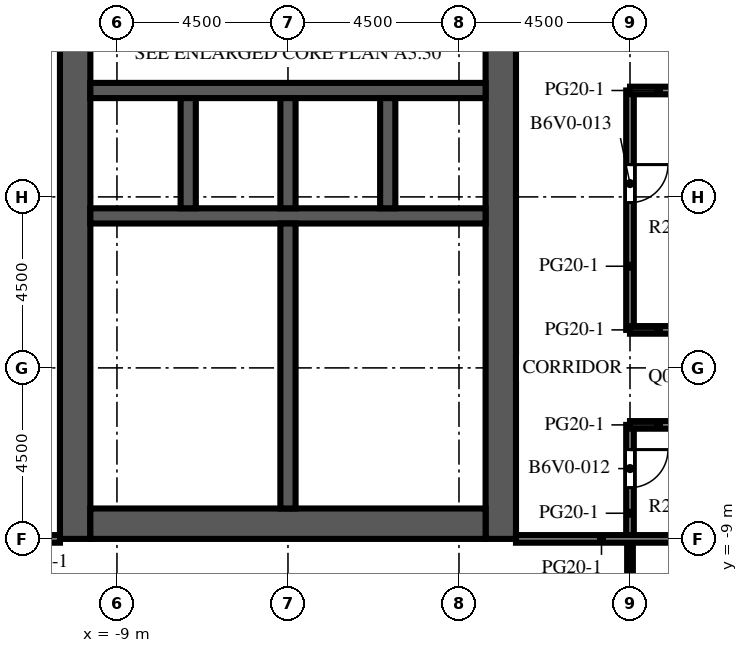
"""IFC4 building model, lengths in metres.
Left out: names, types, materials, properties, quantities, classifications, styles, units other than length and angle.
Written with IfcOpenShell. Run it as: python <this file> out.ifc"""

import sys

from ifc_helpers import new_model, si_unit, direction, frame, frame_2d, origin, place, context, subcontext, project, spatial, rectangle, extrude, element, fill, save


model = new_model("IFC4")
c1 = context("Model", 3, precision=1e-05, world=origin(), true_north=direction((0.0, 1.0)))
c2 = subcontext(c1, "Body", "Model", "MODEL_VIEW")
j1 = project(units=[si_unit("LENGTHUNIT", "METRE"), si_unit("PLANEANGLEUNIT", "RADIAN")], contexts=[c1])
p1 = place(None, origin())
s1 = spatial("IfcSite", under=j1, at=p1, CompositionType="ELEMENT")
p2 = place(p1, origin())
s2 = spatial("IfcBuilding", under=s1, at=p2, CompositionType="ELEMENT")
p3 = place(p2, frame((0.0, 0.0, 195.6)))
s3 = spatial("IfcBuildingStorey", under=s2, at=p3, CompositionType="ELEMENT", Elevation=195.6)
p4 = place(p3, frame((-10.1, -9.0, 0.0), z_axis=(0.0, 0.0, 1.0), x_axis=(0.0, 1.0, 0.0)))
e1 = element("IfcWall", 1, at=p4, inside=s3, PredefinedType="SHEAR", context=c2, shape_type="SweptSolid", body=[
    extrude(rectangle(XDim=27.5, YDim=0.8, at=frame_2d((13.75, 0.0))), origin(), (0.0, 0.0, 1.0), 4.1),
])
p5 = place(p4, frame((12.55, 0.0, 0.0)))
e2 = element("IfcOpeningElement", 2, at=p5, cuts=e1, PredefinedType="OPENING", context=c2, shape_type="SweptSolid", body=[
    extrude(rectangle(XDim=2.4, YDim=2.4, at=frame_2d((1.2, 1.2))), frame((0.0, 0.41, 0.0), z_axis=(0.0, -1.0, 0.0), x_axis=(1.0, 0.0, 0.0)), (0.0, 0.0, 1.0), 0.82),
])
p6 = place(p4, frame((6.825, 0.0, 0.0)))
e3 = element("IfcOpeningElement", 3, at=p6, cuts=e1, PredefinedType="OPENING", context=c2, shape_type="SweptSolid", body=[
    extrude(rectangle(XDim=1.2, YDim=2.1, at=frame_2d((0.6, 1.05))), frame((0.0, 0.41, 0.0), z_axis=(0.0, -1.0, 0.0), x_axis=(1.0, 0.0, 0.0)), (0.0, 0.0, 1.0), 0.82),
])
p7 = place(p4, frame((19.475, 0.0, 0.0)))
e4 = element("IfcOpeningElement", 4, at=p7, cuts=e1, PredefinedType="OPENING", context=c2, shape_type="SweptSolid", body=[
    extrude(rectangle(XDim=1.2, YDim=2.1, at=frame_2d((0.6, 1.05))), frame((0.0, 0.41, 0.0), z_axis=(0.0, -1.0, 0.0), x_axis=(1.0, 0.0, 0.0)), (0.0, 0.0, 1.0), 0.82),
])
p8 = place(p3, frame((1.1, -9.0, 0.0), z_axis=(0.0, 0.0, 1.0), x_axis=(0.0, 1.0, 0.0)))
e5 = element("IfcWall", 5, at=p8, inside=s3, PredefinedType="SHEAR", context=c2, shape_type="SweptSolid", body=[
    extrude(rectangle(XDim=27.5, YDim=0.8, at=frame_2d((13.75, 0.0))), origin(), (0.0, 0.0, 1.0), 4.1),
])
p9 = place(p8, frame((12.55, 0.0, 0.0)))
e6 = element("IfcOpeningElement", 6, at=p9, cuts=e5, PredefinedType="OPENING", context=c2, shape_type="SweptSolid", body=[
    extrude(rectangle(XDim=2.4, YDim=2.4, at=frame_2d((1.2, 1.2))), frame((0.0, 0.41, 0.0), z_axis=(0.0, -1.0, 0.0), x_axis=(1.0, 0.0, 0.0)), (0.0, 0.0, 1.0), 0.82),
])
p10 = place(p8, frame((3.95, 0.0, 0.0)))
e7 = element("IfcOpeningElement", 7, at=p10, cuts=e5, PredefinedType="OPENING", context=c2, shape_type="SweptSolid", body=[
    extrude(rectangle(XDim=1.2, YDim=2.1, at=frame_2d((0.6, 1.05))), frame((0.0, 0.41, 0.0), z_axis=(0.0, -1.0, 0.0), x_axis=(1.0, 0.0, 0.0)), (0.0, 0.0, 1.0), 0.82),
])
p11 = place(p8, frame((19.45, 0.0, 0.0)))
e8 = element("IfcOpeningElement", 8, at=p11, cuts=e5, PredefinedType="OPENING", context=c2, shape_type="SweptSolid", body=[
    extrude(rectangle(XDim=1.0, YDim=2.1, at=frame_2d((0.5, 1.05))), frame((0.0, 0.41, 0.0), z_axis=(0.0, -1.0, 0.0), x_axis=(1.0, 0.0, 0.0)), (0.0, 0.0, 1.0), 0.82),
])
p12 = place(p8, frame((21.137, 0.0, 0.0)))
e9 = element("IfcOpeningElement", 9, at=p12, cuts=e5, PredefinedType="OPENING", context=c2, shape_type="SweptSolid", body=[
    extrude(rectangle(XDim=1.0, YDim=2.1, at=frame_2d((0.5, 1.05))), frame((0.0, 0.41, 0.0), z_axis=(0.0, -1.0, 0.0), x_axis=(1.0, 0.0, 0.0)), (0.0, 0.0, 1.0), 0.82),
])
p13 = place(p8, frame((23.2, 0.0, 0.0)))
e10 = element("IfcOpeningElement", 10, at=p13, cuts=e5, PredefinedType="OPENING", context=c2, shape_type="SweptSolid", body=[
    extrude(rectangle(XDim=1.0, YDim=2.1, at=frame_2d((0.5, 1.05))), frame((0.0, 0.41, 0.0), z_axis=(0.0, -1.0, 0.0), x_axis=(1.0, 0.0, 0.0)), (0.0, 0.0, 1.0), 0.82),
])
p14 = place(p8, frame((25.262, 0.0, 0.0)))
e11 = element("IfcOpeningElement", 11, at=p14, cuts=e5, PredefinedType="OPENING", context=c2, shape_type="SweptSolid", body=[
    extrude(rectangle(XDim=1.0, YDim=2.1, at=frame_2d((0.5, 1.05))), frame((0.0, 0.41, 0.0), z_axis=(0.0, -1.0, 0.0), x_axis=(1.0, 0.0, 0.0)), (0.0, 0.0, 1.0), 0.82),
])
p15 = place(p3, frame((-9.7, -8.6, 0.0), z_axis=(0.0, 0.0, 1.0), x_axis=(1.0, 0.0, 0.0)))
e12 = element("IfcWall", 12, at=p15, inside=s3, PredefinedType="SHEAR", context=c2, shape_type="SweptSolid", body=[
    extrude(rectangle(XDim=10.4, YDim=0.8, at=frame_2d((5.2, 0.0))), origin(), (0.0, 0.0, 1.0), 4.1),
])
p16 = place(p3, frame((-9.7, -0.5, 0.0), z_axis=(0.0, 0.0, 1.0), x_axis=(1.0, 0.0, 0.0)))
e13 = element("IfcWall", 13, at=p16, inside=s3, PredefinedType="SHEAR", context=c2, shape_type="SweptSolid", body=[
    extrude(rectangle(XDim=10.4, YDim=0.4, at=frame_2d((5.2, 0.0))), origin(), (0.0, 0.0, 1.0), 4.1),
])
p17 = place(p3, frame((-9.7, 2.8, 0.0), z_axis=(0.0, 0.0, 1.0), x_axis=(1.0, 0.0, 0.0)))
e14 = element("IfcWall", 14, at=p17, inside=s3, PredefinedType="SHEAR", context=c2, shape_type="SweptSolid", body=[
    extrude(rectangle(XDim=10.4, YDim=0.4, at=frame_2d((5.2, 0.0))), origin(), (0.0, 0.0, 1.0), 4.1),
])
p18 = place(p17, frame((0.738, 0.0, 0.0)))
e15 = element("IfcOpeningElement", 15, at=p18, cuts=e14, PredefinedType="OPENING", context=c2, shape_type="SweptSolid", body=[
    extrude(rectangle(XDim=1.1, YDim=2.1, at=frame_2d((0.55, 1.05))), frame((0.0, 0.21, 0.0), z_axis=(0.0, -1.0, 0.0), x_axis=(1.0, 0.0, 0.0)), (0.0, 0.0, 1.0), 0.42),
])
p19 = place(p17, frame((3.337, 0.0, 0.0)))
e16 = element("IfcOpeningElement", 16, at=p19, cuts=e14, PredefinedType="OPENING", context=c2, shape_type="SweptSolid", body=[
    extrude(rectangle(XDim=1.1, YDim=2.1, at=frame_2d((0.55, 1.05))), frame((0.0, 0.21, 0.0), z_axis=(0.0, -1.0, 0.0), x_axis=(1.0, 0.0, 0.0)), (0.0, 0.0, 1.0), 0.42),
])
p20 = place(p17, frame((6.012, 0.0, 0.0)))
e17 = element("IfcOpeningElement", 17, at=p20, cuts=e14, PredefinedType="OPENING", context=c2, shape_type="SweptSolid", body=[
    extrude(rectangle(XDim=1.0, YDim=2.1, at=frame_2d((0.5, 1.05))), frame((0.0, 0.21, 0.0), z_axis=(0.0, -1.0, 0.0), x_axis=(1.0, 0.0, 0.0)), (0.0, 0.0, 1.0), 0.42),
])
p21 = place(p17, frame((8.613, 0.0, 0.0)))
e18 = element("IfcOpeningElement", 18, at=p21, cuts=e14, PredefinedType="OPENING", context=c2, shape_type="SweptSolid", body=[
    extrude(rectangle(XDim=1.0, YDim=2.1, at=frame_2d((0.5, 1.05))), frame((0.0, 0.21, 0.0), z_axis=(0.0, -1.0, 0.0), x_axis=(1.0, 0.0, 0.0)), (0.0, 0.0, 1.0), 0.42),
])
for number, where, z_axis, x_axis in (
    (19, (-7.125, -0.3, 0.0), (0.0, 0.0, 1.0), (0.0, 1.0, 0.0)),
    (20, (-4.5, -0.3, 0.0), (0.0, 0.0, 1.0), (0.0, 1.0, 0.0)),
    (21, (-1.875, -0.3, 0.0), (0.0, 0.0, 1.0), (0.0, 1.0, 0.0)),
):
    element("IfcWall", number, at=place(p3, frame(where, z_axis=z_axis, x_axis=x_axis)), inside=s3, PredefinedType="SHEAR", context=c2, shape_type="SweptSolid", body=[
        extrude(rectangle(XDim=2.9, YDim=0.4, at=frame_2d((1.45, 0.0))), origin(), (0.0, 0.0, 1.0), 4.1),
    ])
p22 = place(p3, frame((-4.5, -8.2, 0.0), z_axis=(0.0, 0.0, 1.0), x_axis=(0.0, 1.0, 0.0)))
e22 = element("IfcWall", 22, at=p22, inside=s3, PredefinedType="SHEAR", context=c2, shape_type="SweptSolid", body=[
    extrude(rectangle(XDim=7.5, YDim=0.4, at=frame_2d((3.75, 0.0))), origin(), (0.0, 0.0, 1.0), 4.1),
])
p23 = place(p3, frame((-0.9, -5.95, 0.0), z_axis=(0.0, 0.0, 1.0), x_axis=(1.0, 0.0, 0.0)))
e23 = element("IfcWall", 23, at=p23, inside=s3, PredefinedType="PARTITIONING", context=c2, shape_type="SweptSolid", body=[
    extrude(rectangle(XDim=1.6, YDim=0.1, at=frame_2d((0.8, 0.0))), origin(), (0.0, 0.0, 1.0), 3.65),
])
p24 = place(p23, frame((0.3, 0.0, 0.0)))
e24 = element("IfcOpeningElement", 24, at=p24, cuts=e23, PredefinedType="OPENING", context=c2, shape_type="SweptSolid", body=[
    extrude(rectangle(XDim=1.0, YDim=2.1, at=frame_2d((0.5, 1.05))), frame((0.0, 0.06, 0.0), z_axis=(0.0, -1.0, 0.0), x_axis=(1.0, 0.0, 0.0)), (0.0, 0.0, 1.0), 0.12),
])
p25 = place(p3, frame((-0.9, -2.95, 0.0), z_axis=(0.0, 0.0, 1.0), x_axis=(1.0, 0.0, 0.0)))
e25 = element("IfcWall", 25, at=p25, inside=s3, PredefinedType="PARTITIONING", context=c2, shape_type="SweptSolid", body=[
    extrude(rectangle(XDim=1.6, YDim=0.1, at=frame_2d((0.8, 0.0))), origin(), (0.0, 0.0, 1.0), 3.65),
])
p26 = place(p25, frame((0.3, 0.0, 0.0)))
e26 = element("IfcOpeningElement", 26, at=p26, cuts=e25, PredefinedType="OPENING", context=c2, shape_type="SweptSolid", body=[
    extrude(rectangle(XDim=1.0, YDim=2.1, at=frame_2d((0.5, 1.05))), frame((0.0, 0.06, 0.0), z_axis=(0.0, -1.0, 0.0), x_axis=(1.0, 0.0, 0.0)), (0.0, 0.0, 1.0), 0.12),
])
p27 = place(p3, frame((-0.9, -5.95, 0.0), z_axis=(0.0, 0.0, 1.0), x_axis=(0.0, 1.0, 0.0)))
e27 = element("IfcWall", 27, at=p27, inside=s3, PredefinedType="PARTITIONING", context=c2, shape_type="SweptSolid", body=[
    extrude(rectangle(XDim=3.0, YDim=0.1, at=frame_2d((1.5, 0.0))), origin(), (0.0, 0.0, 1.0), 3.65),
])
p28 = place(p27, frame((1.0, 0.0, 0.0)))
e28 = element("IfcOpeningElement", 28, at=p28, cuts=e27, PredefinedType="OPENING", context=c2, shape_type="SweptSolid", body=[
    extrude(rectangle(XDim=1.0, YDim=2.1, at=frame_2d((0.5, 1.05))), frame((0.0, 0.06, 0.0), z_axis=(0.0, -1.0, 0.0), x_axis=(1.0, 0.0, 0.0)), (0.0, 0.0, 1.0), 0.12),
])
for number, where, z_axis, x_axis in (
    (29, (-4.3, -5.95, 0.0), (0.0, 0.0, 1.0), (1.0, 0.0, 0.0)),
    (30, (-4.3, -2.95, 0.0), (0.0, 0.0, 1.0), (1.0, 0.0, 0.0)),
):
    element("IfcWall", number, at=place(p3, frame(where, z_axis=z_axis, x_axis=x_axis)), inside=s3, PredefinedType="PARTITIONING", context=c2, shape_type="SweptSolid", body=[
        extrude(rectangle(XDim=3.4, YDim=0.1, at=frame_2d((1.7, 0.0))), origin(), (0.0, 0.0, 1.0), 3.65),
    ])
p29 = place(p3, frame((4.5, -9.0, 0.0), z_axis=(0.0, 0.0, 1.0), x_axis=(0.0, -1.0, 0.0)))
e31 = element("IfcWall", 31, at=p29, inside=s3, PredefinedType="PARTITIONING", context=c2, shape_type="SweptSolid", body=[
    extrude(rectangle(XDim=17.5, YDim=0.15, at=frame_2d((8.75, 0.0))), origin(), (0.0, 0.0, 1.0), 3.65),
])
p30 = place(p29, frame((3.4, 0.0, 0.0)))
e32 = element("IfcOpeningElement", 32, at=p30, cuts=e31, PredefinedType="OPENING", context=c2, shape_type="SweptSolid", body=[
    extrude(rectangle(XDim=1.0, YDim=2.1, at=frame_2d((0.5, 1.05))), frame((0.0, 0.085, 0.0), z_axis=(0.0, -1.0, 0.0), x_axis=(1.0, 0.0, 0.0)), (0.0, 0.0, 1.0), 0.17),
])
p31 = place(p3, frame((4.5, -6.0, 0.0), z_axis=(0.0, 0.0, 1.0), x_axis=(0.0, -1.0, 0.0)))
e33 = element("IfcWall", 33, at=p31, inside=s3, PredefinedType="PARTITIONING", context=c2, shape_type="SweptSolid", body=[
    extrude(rectangle(XDim=3.0, YDim=0.2, at=frame_2d((1.5, 0.0))), origin(), (0.0, 0.0, 1.0), 3.65),
])
p32 = place(p31, frame((0.65, 0.0, 0.0)))
e34 = element("IfcOpeningElement", 34, at=p32, cuts=e33, PredefinedType="OPENING", context=c2, shape_type="SweptSolid", body=[
    extrude(rectangle(XDim=1.0, YDim=2.1, at=frame_2d((0.5, 1.05))), frame((0.0, 0.11, 0.0), z_axis=(0.0, -1.0, 0.0), x_axis=(1.0, 0.0, 0.0)), (0.0, 0.0, 1.0), 0.22),
])
p33 = place(p3, frame((4.5, 2.8, 0.0), z_axis=(0.0, 0.0, 1.0), x_axis=(0.0, -1.0, 0.0)))
e35 = element("IfcWall", 35, at=p33, inside=s3, PredefinedType="PARTITIONING", context=c2, shape_type="SweptSolid", body=[
    extrude(rectangle(XDim=6.3, YDim=0.2, at=frame_2d((3.15, 0.0))), origin(), (0.0, 0.0, 1.0), 3.65),
])
p34 = place(p33, frame((1.95, 0.0, 0.0)))
e36 = element("IfcOpeningElement", 36, at=p34, cuts=e35, PredefinedType="OPENING", context=c2, shape_type="SweptSolid", body=[
    extrude(rectangle(XDim=1.0, YDim=2.1, at=frame_2d((0.5, 1.05))), frame((0.0, 0.11, 0.0), z_axis=(0.0, -1.0, 0.0), x_axis=(1.0, 0.0, 0.0)), (0.0, 0.0, 1.0), 0.22),
])
p35 = place(p3, frame((-10.5, -9.0, 0.0), z_axis=(0.0, 0.0, 1.0), x_axis=(-1.0, 0.0, 0.0)))
e37 = element("IfcWall", 37, at=p35, inside=s3, PredefinedType="PARTITIONING", context=c2, shape_type="SweptSolid", body=[
    extrude(rectangle(XDim=3.0, YDim=0.2, at=frame_2d((1.5, 0.0))), origin(), (0.0, 0.0, 1.0), 3.65),
])
p36 = place(p35, frame((1.15, 0.0, 0.0)))
e38 = element("IfcOpeningElement", 38, at=p36, cuts=e37, PredefinedType="OPENING", context=c2, shape_type="SweptSolid", body=[
    extrude(rectangle(XDim=1.0, YDim=2.1, at=frame_2d((0.5, 1.05))), frame((0.0, 0.11, 0.0), z_axis=(0.0, -1.0, 0.0), x_axis=(1.0, 0.0, 0.0)), (0.0, 0.0, 1.0), 0.22),
])
p37 = place(p3, frame((1.5, -9.0, 0.0), z_axis=(0.0, 0.0, 1.0), x_axis=(1.0, 0.0, 0.0)))
e39 = element("IfcWall", 39, at=p37, inside=s3, PredefinedType="PARTITIONING", context=c2, shape_type="SweptSolid", body=[
    extrude(rectangle(XDim=4.5, YDim=0.2, at=frame_2d((2.25, 0.0))), origin(), (0.0, 0.0, 1.0), 3.65),
])
for number, where, z_axis, x_axis in (
    (40, (4.5, -6.0, 0.0), (0.0, 0.0, 1.0), (1.0, 0.0, 0.0)),
    (41, (4.5, -3.5, 0.0), (0.0, 0.0, 1.0), (1.0, 0.0, 0.0)),
    (42, (4.5, 2.8, 0.0), (0.0, 0.0, 1.0), (1.0, 0.0, 0.0)),
):
    element("IfcWall", number, at=place(p3, frame(where, z_axis=z_axis, x_axis=x_axis)), inside=s3, PredefinedType="PARTITIONING", context=c2, shape_type="SweptSolid", body=[
        extrude(rectangle(XDim=1.5, YDim=0.2, at=frame_2d((0.75, 0.0))), origin(), (0.0, 0.0, 1.0), 3.65),
    ])
p38 = place(p18, origin())
e43 = element("IfcDoor", 43, at=p38, inside=s3, OperationType="DOUBLE_DOOR_SLIDING", PredefinedType="DOOR", context=c2, shape_type="SweptSolid", body=[
    extrude(rectangle(XDim=1.1, YDim=2.1, at=frame_2d((0.55, 1.05))), frame((0.0, 0.025, 0.0), z_axis=(0.0, -1.0, 0.0), x_axis=(1.0, 0.0, 0.0)), (0.0, 0.0, 1.0), 0.05),
])
fill(e15, e43)
p39 = place(p19, origin())
e44 = element("IfcDoor", 44, at=p39, inside=s3, OperationType="DOUBLE_DOOR_SLIDING", PredefinedType="DOOR", context=c2, shape_type="SweptSolid", body=[
    extrude(rectangle(XDim=1.1, YDim=2.1, at=frame_2d((0.55, 1.05))), frame((0.0, 0.025, 0.0), z_axis=(0.0, -1.0, 0.0), x_axis=(1.0, 0.0, 0.0)), (0.0, 0.0, 1.0), 0.05),
])
fill(e16, e44)
p40 = place(p5, origin())
e45 = element("IfcDoor", 45, at=p40, inside=s3, OperationType="DOUBLE_DOOR_DOUBLE_SWING", PredefinedType="DOOR", context=c2, shape_type="SweptSolid", body=[
    extrude(rectangle(XDim=2.4, YDim=2.4, at=frame_2d((1.2, 1.2))), frame((0.0, 0.025, 0.0), z_axis=(0.0, -1.0, 0.0), x_axis=(1.0, 0.0, 0.0)), (0.0, 0.0, 1.0), 0.05),
])
fill(e2, e45)
p41 = place(p9, origin())
e46 = element("IfcDoor", 46, at=p41, inside=s3, OperationType="DOUBLE_DOOR_DOUBLE_SWING", PredefinedType="DOOR", context=c2, shape_type="SweptSolid", body=[
    extrude(rectangle(XDim=2.4, YDim=2.4, at=frame_2d((1.2, 1.2))), frame((0.0, 0.025, 0.0), z_axis=(0.0, -1.0, 0.0), x_axis=(1.0, 0.0, 0.0)), (0.0, 0.0, 1.0), 0.05),
])
fill(e6, e46)
p42 = place(p6, origin())
e47 = element("IfcDoor", 47, at=p42, inside=s3, OperationType="SINGLE_SWING_LEFT", PredefinedType="DOOR", context=c2, shape_type="SweptSolid", body=[
    extrude(rectangle(XDim=1.2, YDim=2.1, at=frame_2d((0.6, 1.05))), frame((0.0, 0.025, 0.0), z_axis=(0.0, -1.0, 0.0), x_axis=(1.0, 0.0, 0.0)), (0.0, 0.0, 1.0), 0.05),
])
fill(e3, e47)
p43 = place(p20, origin())
e48 = element("IfcDoor", 48, at=p43, inside=s3, OperationType="SINGLE_SWING_LEFT", PredefinedType="DOOR", context=c2, shape_type="SweptSolid", body=[
    extrude(rectangle(XDim=1.0, YDim=2.1, at=frame_2d((0.5, 1.05))), frame((0.0, 0.025, 0.0), z_axis=(0.0, -1.0, 0.0), x_axis=(1.0, 0.0, 0.0)), (0.0, 0.0, 1.0), 0.05),
])
fill(e17, e48)
p44 = place(p21, origin())
e49 = element("IfcDoor", 49, at=p44, inside=s3, OperationType="SINGLE_SWING_RIGHT", PredefinedType="DOOR", context=c2, shape_type="SweptSolid", body=[
    extrude(rectangle(XDim=1.0, YDim=2.1, at=frame_2d((0.5, 1.05))), frame((0.0, 0.025, 0.0), z_axis=(0.0, -1.0, 0.0), x_axis=(1.0, 0.0, 0.0)), (0.0, 0.0, 1.0), 0.05),
])
fill(e18, e49)
p45 = place(p10, origin())
e50 = element("IfcDoor", 50, at=p45, inside=s3, OperationType="SINGLE_SWING_LEFT", PredefinedType="DOOR", context=c2, shape_type="SweptSolid", body=[
    extrude(rectangle(XDim=1.2, YDim=2.1, at=frame_2d((0.6, 1.05))), frame((0.0, 0.375, 0.0), z_axis=(0.0, -1.0, 0.0), x_axis=(1.0, 0.0, 0.0)), (0.0, 0.0, 1.0), 0.05),
])
fill(e7, e50)
p46 = place(p24, origin())
e51 = element("IfcDoor", 51, at=p46, inside=s3, OperationType="SINGLE_SWING_RIGHT", PredefinedType="DOOR", context=c2, shape_type="SweptSolid", body=[
    extrude(rectangle(XDim=1.0, YDim=2.1, at=frame_2d((0.5, 1.05))), frame((0.0, 0.025, 0.0), z_axis=(0.0, -1.0, 0.0), x_axis=(1.0, 0.0, 0.0)), (0.0, 0.0, 1.0), 0.05),
])
fill(e24, e51)
p47 = place(p26, origin())
e52 = element("IfcDoor", 52, at=p47, inside=s3, OperationType="SINGLE_SWING_LEFT", PredefinedType="DOOR", context=c2, shape_type="SweptSolid", body=[
    extrude(rectangle(XDim=1.0, YDim=2.1, at=frame_2d((0.5, 1.05))), frame((0.0, 0.025, 0.0), z_axis=(0.0, -1.0, 0.0), x_axis=(1.0, 0.0, 0.0)), (0.0, 0.0, 1.0), 0.05),
])
fill(e26, e52)
p48 = place(p28, origin())
e53 = element("IfcDoor", 53, at=p48, inside=s3, OperationType="SINGLE_SWING_RIGHT", PredefinedType="DOOR", context=c2, shape_type="SweptSolid", body=[
    extrude(rectangle(XDim=1.0, YDim=2.1, at=frame_2d((0.5, 1.05))), frame((0.0, 0.025, 0.0), z_axis=(0.0, -1.0, 0.0), x_axis=(1.0, 0.0, 0.0)), (0.0, 0.0, 1.0), 0.05),
])
fill(e28, e53)
p49 = place(p32, origin())
e54 = element("IfcDoor", 54, at=p49, inside=s3, OperationType="SINGLE_SWING_LEFT", PredefinedType="DOOR", context=c2, shape_type="SweptSolid", body=[
    extrude(rectangle(XDim=1.0, YDim=2.1, at=frame_2d((0.5, 1.05))), frame((0.0, 0.025, 0.0), z_axis=(0.0, -1.0, 0.0), x_axis=(1.0, 0.0, 0.0)), (0.0, 0.0, 1.0), 0.05),
])
fill(e34, e54)
p50 = place(p34, origin())
e55 = element("IfcDoor", 55, at=p50, inside=s3, OperationType="SINGLE_SWING_LEFT", PredefinedType="DOOR", context=c2, shape_type="SweptSolid", body=[
    extrude(rectangle(XDim=1.0, YDim=2.1, at=frame_2d((0.5, 1.05))), frame((0.0, 0.025, 0.0), z_axis=(0.0, -1.0, 0.0), x_axis=(1.0, 0.0, 0.0)), (0.0, 0.0, 1.0), 0.05),
])
fill(e36, e55)
save(model, sys.argv[1])
